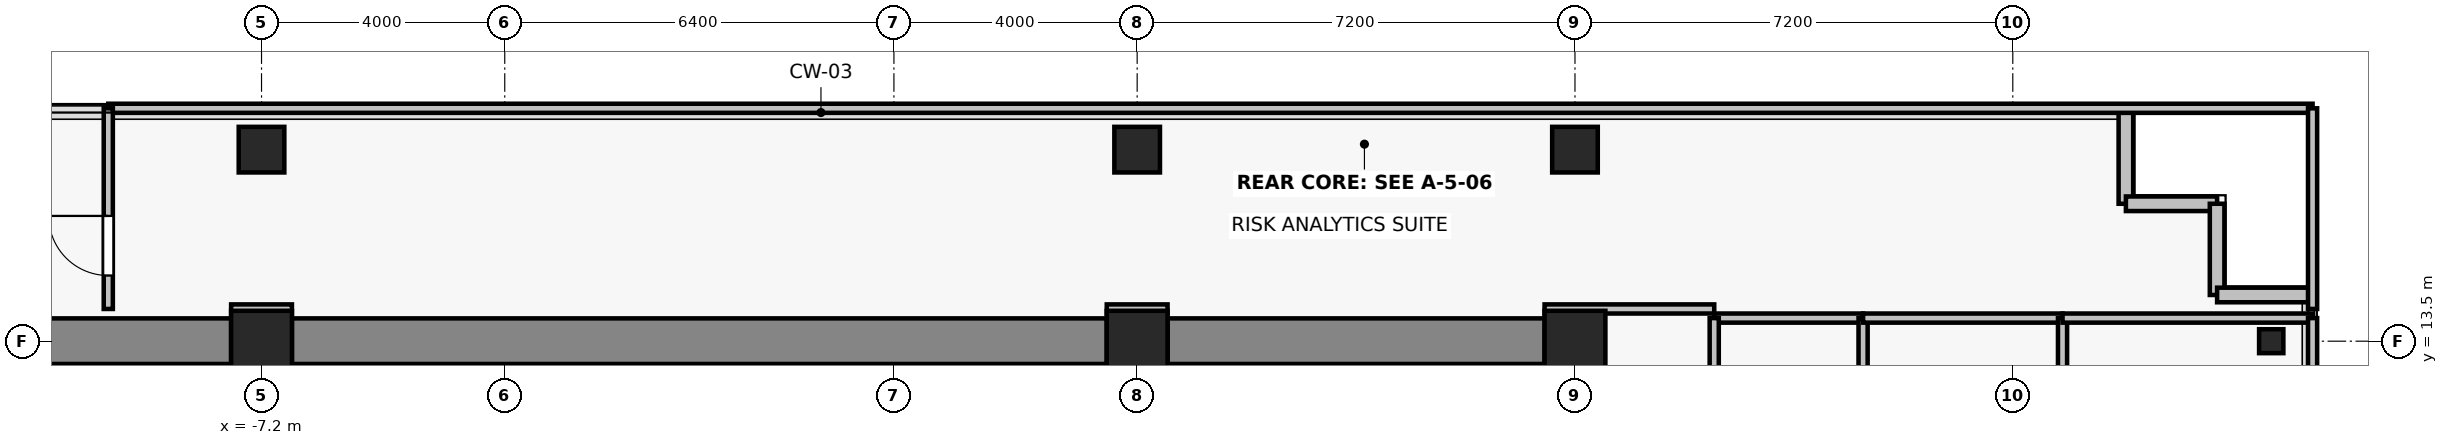
"""IFC4 building model, lengths in metres.
Left out: names, types, materials, properties, quantities, classifications, styles, units other than length and angle.
Written with IfcOpenShell. Run it as: python <this file> out.ifc"""

import sys

from ifc_helpers import new_model, si_unit, direction, frame, frame_2d, origin, origin_2d, place, context, subcontext, project, spatial, rectangle, i_section, extrude, source, transform, mapped, element, fill, save


model = new_model("IFC4")
c1 = context("Model", 3, precision=1e-05, world=origin(), true_north=direction((0.0, 1.0)))
c2 = subcontext(c1, "Body", "Model", "MODEL_VIEW")
j1 = project(units=[si_unit("LENGTHUNIT", "METRE"), si_unit("PLANEANGLEUNIT", "RADIAN")], contexts=[c1])
p1 = place(None, origin())
s1 = spatial("IfcSite", under=j1, at=p1, CompositionType="ELEMENT")
p2 = place(p1, origin())
s2 = spatial("IfcBuilding", under=s1, at=p2, CompositionType="ELEMENT")
p3 = place(p2, frame((0.0, 0.0, 185.8)))
s3 = spatial("IfcBuildingStorey", under=s2, at=p3, CompositionType="ELEMENT", Elevation=185.8)
for number, where, z_axis, x_axis in (
    (1, (-7.2, 13.5, 0.0), (0.0, 0.0, 1.0), (1.0, 0.0, 0.0)),
    (2, (7.2, 13.5, 0.0), (0.0, 0.0, 1.0), (1.0, 0.0, 0.0)),
    (3, (14.4, 13.5, 0.0), (0.0, 0.0, 1.0), (1.0, 0.0, 0.0)),
):
    element("IfcColumn", number, at=place(p3, frame(where, z_axis=z_axis, x_axis=x_axis)), inside=s3, PredefinedType="COLUMN", context=c2, shape_type="SweptSolid", body=[
        extrude(rectangle(XDim=1.0, YDim=1.0, at=origin_2d()), origin(), (0.0, 0.0, 1.0), 3.3),
    ])
for number, where, z_axis, x_axis in (
    (4, (-7.2, 16.65, 0.0), (0.0, 0.0, 1.0), (1.0, 0.0, 0.0)),
    (5, (7.2, 16.65, 0.0), (0.0, 0.0, 1.0), (1.0, 0.0, 0.0)),
    (6, (14.4, 16.65, 0.0), (0.0, 0.0, 1.0), (1.0, 0.0, 0.0)),
):
    element("IfcColumn", number, at=place(p3, frame(where, z_axis=z_axis, x_axis=x_axis)), inside=s3, PredefinedType="COLUMN", context=c2, shape_type="SweptSolid", body=[
        extrude(rectangle(XDim=0.75, YDim=0.75, at=origin_2d()), origin(), (0.0, 0.0, 1.0), 3.3),
    ])
p4 = place(p3, frame((25.85, 13.5, 0.0), z_axis=(0.0, 0.0, 1.0), x_axis=(1.0, 0.0, 0.0)))
e7 = element("IfcColumn", 7, at=p4, inside=s3, PredefinedType="COLUMN", context=c2, shape_type="SweptSolid", body=[
    extrude(i_section(OverallWidth=0.399, OverallDepth=0.394, WebThickness=0.023, FlangeThickness=0.037, FilletRadius=0.015, at=origin_2d()), origin(), (0.0, 0.0, 1.0), 3.3),
])
p5 = place(p3, frame((-13.9, 13.5, 0.0), z_axis=(0.0, 0.0, 1.0), x_axis=(1.0, 0.0, 0.0)))
e8 = element("IfcWall", 8, at=p5, inside=s3, PredefinedType="SHEAR", context=c2, shape_type="SweptSolid", body=[
    extrude(rectangle(XDim=6.2, YDim=0.75, at=frame_2d((3.1, 0.0))), origin(), (0.0, 0.0, 1.0), 3.075),
])
p6 = place(p3, frame((-6.7, 13.5, 0.0), z_axis=(0.0, 0.0, 1.0), x_axis=(1.0, 0.0, 0.0)))
e9 = element("IfcWall", 9, at=p6, inside=s3, PredefinedType="SHEAR", context=c2, shape_type="SweptSolid", body=[
    extrude(rectangle(XDim=13.4, YDim=0.75, at=frame_2d((6.7, 0.0))), origin(), (0.0, 0.0, 1.0), 3.075),
])
p7 = place(p3, frame((7.7, 13.5, 0.0), z_axis=(0.0, 0.0, 1.0), x_axis=(1.0, 0.0, 0.0)))
e10 = element("IfcWall", 10, at=p7, inside=s3, PredefinedType="SHEAR", context=c2, shape_type="SweptSolid", body=[
    extrude(rectangle(XDim=6.2, YDim=0.75, at=frame_2d((3.1, 0.0))), origin(), (0.0, 0.0, 1.0), 3.075),
])
for number, where, z_axis, x_axis in (
    (11, (23.46, 15.76, 0.0), (0.0, 0.0, 1.0), (0.0, 1.0, 0.0)),
    (12, (24.96, 15.76, 0.0), (0.0, 0.0, 1.0), (-1.0, 0.0, 0.0)),
    (13, (24.96, 14.26, 0.0), (0.0, 0.0, 1.0), (0.0, 1.0, 0.0)),
    (14, (26.46, 14.26, 0.0), (0.0, 0.0, 1.0), (-1.0, 0.0, 0.0)),
):
    element("IfcWall", number, at=place(p3, frame(where, z_axis=z_axis, x_axis=x_axis)), inside=s3, PredefinedType="SOLIDWALL", context=c2, shape_type="SweptSolid", body=[
        extrude(rectangle(XDim=1.5, YDim=0.24, at=frame_2d((0.75, 0.0))), origin(), (0.0, 0.0, 1.0), 3.075),
    ])
p8 = place(p3, frame((16.69, 13.88, 0.0), z_axis=(0.0, 0.0, 1.0), x_axis=(1.0, 0.0, 0.0)))
e15 = element("IfcWall", 15, at=p8, inside=s3, PredefinedType="PARTITIONING", context=c2, shape_type="SweptSolid", body=[
    extrude(rectangle(XDim=2.448, YDim=0.15, at=frame_2d((1.224, 0.0))), origin(), (0.0, 0.0, 1.0), 3.075),
])
for number, where, z_axis, x_axis in (
    (16, (16.69, -1.77, 0.0), (0.0, 0.0, 1.0), (0.0, 1.0, 0.0)),
    (17, (19.138, 13.88, 0.0), (0.0, 0.0, 1.0), (0.0, -1.0, 0.0)),
):
    element("IfcWall", number, at=place(p3, frame(where, z_axis=z_axis, x_axis=x_axis)), inside=s3, PredefinedType="PARTITIONING", context=c2, shape_type="SweptSolid", body=[
        extrude(rectangle(XDim=15.65, YDim=0.15, at=frame_2d((7.825, 0.0))), origin(), (0.0, 0.0, 1.0), 2.565),
    ])
p9 = place(p3, frame((19.138, 13.88, 0.0), z_axis=(0.0, 0.0, 1.0), x_axis=(1.0, 0.0, 0.0)))
e18 = element("IfcWall", 18, at=p9, inside=s3, PredefinedType="PARTITIONING", context=c2, shape_type="SweptSolid", body=[
    extrude(rectangle(XDim=3.28, YDim=0.15, at=frame_2d((1.64, 0.0))), origin(), (0.0, 0.0, 1.0), 3.075),
])
p10 = place(p3, frame((22.418, 13.88, 0.0), z_axis=(0.0, 0.0, 1.0), x_axis=(0.0, -1.0, 0.0)))
e19 = element("IfcWall", 19, at=p10, inside=s3, PredefinedType="PARTITIONING", context=c2, shape_type="SweptSolid", body=[
    extrude(rectangle(XDim=15.65, YDim=0.15, at=frame_2d((7.825, 0.0))), origin(), (0.0, 0.0, 1.0), 2.565),
])
p11 = place(p3, frame((22.418, 13.88, 0.0), z_axis=(0.0, 0.0, 1.0), x_axis=(1.0, 0.0, 0.0)))
e20 = element("IfcWall", 20, at=p11, inside=s3, PredefinedType="PARTITIONING", context=c2, shape_type="SweptSolid", body=[
    extrude(rectangle(XDim=4.112, YDim=0.15, at=frame_2d((2.056, 0.0))), origin(), (0.0, 0.0, 1.0), 3.075),
])
p12 = place(p3, frame((26.53, 13.88, 0.0), z_axis=(0.0, 0.0, 1.0), x_axis=(0.0, -1.0, 0.0)))
e21 = element("IfcWall", 21, at=p12, inside=s3, PredefinedType="PARTITIONING", context=c2, shape_type="SweptSolid", body=[
    extrude(rectangle(XDim=15.65, YDim=0.15, at=frame_2d((7.825, 0.0))), origin(), (0.0, 0.0, 1.0), 3.075),
])
for number, where, z_axis, x_axis in (
    (22, (-6.7, 14.03, 0.0), (0.0, 0.0, 1.0), (-1.0, 0.0, 0.0)),
    (23, (7.7, 14.03, 0.0), (0.0, 0.0, 1.0), (-1.0, 0.0, 0.0)),
):
    element("IfcWall", number, at=place(p3, frame(where, z_axis=z_axis, x_axis=x_axis)), inside=s3, PredefinedType="PARTITIONING", context=c2, shape_type="SweptSolid", body=[
        extrude(rectangle(XDim=1.0, YDim=0.15, at=frame_2d((0.5, 0.0))), origin(), (0.0, 0.0, 1.0), 2.565),
    ])
p13 = place(p3, frame((16.69, 14.03, 0.0), z_axis=(0.0, 0.0, 1.0), x_axis=(-1.0, 0.0, 0.0)))
e24 = element("IfcWall", 24, at=p13, inside=s3, PredefinedType="PARTITIONING", context=c2, shape_type="SweptSolid", body=[
    extrude(rectangle(XDim=2.79, YDim=0.15, at=frame_2d((1.395, 0.0))), origin(), (0.0, 0.0, 1.0), 2.565),
])
p14 = place(p3, frame((-9.72, 17.33, 0.0), z_axis=(0.0, 0.0, 1.0), x_axis=(1.0, 0.0, 0.0)))
e25 = element("IfcWall", 25, at=p14, inside=s3, PredefinedType="PARTITIONING", context=c2, shape_type="SweptSolid", body=[
    extrude(rectangle(XDim=36.25, YDim=0.15, at=frame_2d((18.125, 0.0))), origin(), (0.0, 0.0, 1.0), 3.075),
])
p15 = place(p3, frame((-9.72, 14.03, 0.0), z_axis=(0.0, 0.0, 1.0), x_axis=(0.0, 1.0, 0.0)))
e26 = element("IfcWall", 26, at=p15, inside=s3, PredefinedType="PARTITIONING", context=c2, shape_type="SweptSolid", body=[
    extrude(rectangle(XDim=3.3, YDim=0.15, at=frame_2d((1.65, 0.0))), origin(), (0.0, 0.0, 1.0), 2.565),
])
p16 = place(p15, frame((0.55, 0.0, 0.0)))
e27 = element("IfcOpeningElement", 27, at=p16, cuts=e26, PredefinedType="OPENING", context=c2, shape_type="SweptSolid", body=[
    extrude(rectangle(XDim=0.98, YDim=2.15, at=frame_2d((0.49, 1.075))), frame((0.0, 0.085, 0.0), z_axis=(0.0, -1.0, 0.0), x_axis=(1.0, 0.0, 0.0)), (0.0, 0.0, 1.0), 0.17),
])
p17 = place(p3, frame((26.53, 17.33, 0.0), z_axis=(0.0, 0.0, 1.0), x_axis=(0.0, -1.0, 0.0)))
e28 = element("IfcWall", 28, at=p17, inside=s3, PredefinedType="PARTITIONING", context=c2, shape_type="SweptSolid", body=[
    extrude(rectangle(XDim=3.3, YDim=0.15, at=frame_2d((1.65, 0.0))), origin(), (0.0, 0.0, 1.0), 3.075),
])
m1 = source(origin(), c2, "Body", "SweptSolid", [
    extrude(rectangle(XDim=0.98, YDim=2.15, at=frame_2d((0.49, 1.075))), frame((0.0, 0.025, 0.0), z_axis=(0.0, -1.0, 0.0), x_axis=(1.0, 0.0, 0.0)), (0.0, 0.0, 1.0), 0.05),
])
p18 = place(p16, origin())
e29 = element("IfcDoor", 29, at=p18, inside=s3, OperationType="SINGLE_SWING_RIGHT", PredefinedType="DOOR", context=c2, shape_type="MappedRepresentation", body=[
    mapped(m1, transform((0.0, 0.0, 0.0), x_axis=(1.0, 0.0, 0.0), y_axis=(0.0, 1.0, 0.0), z_axis=(0.0, 0.0, 1.0), scale=1.0)),
])
fill(e27, e29)
save(model, sys.argv[1])
